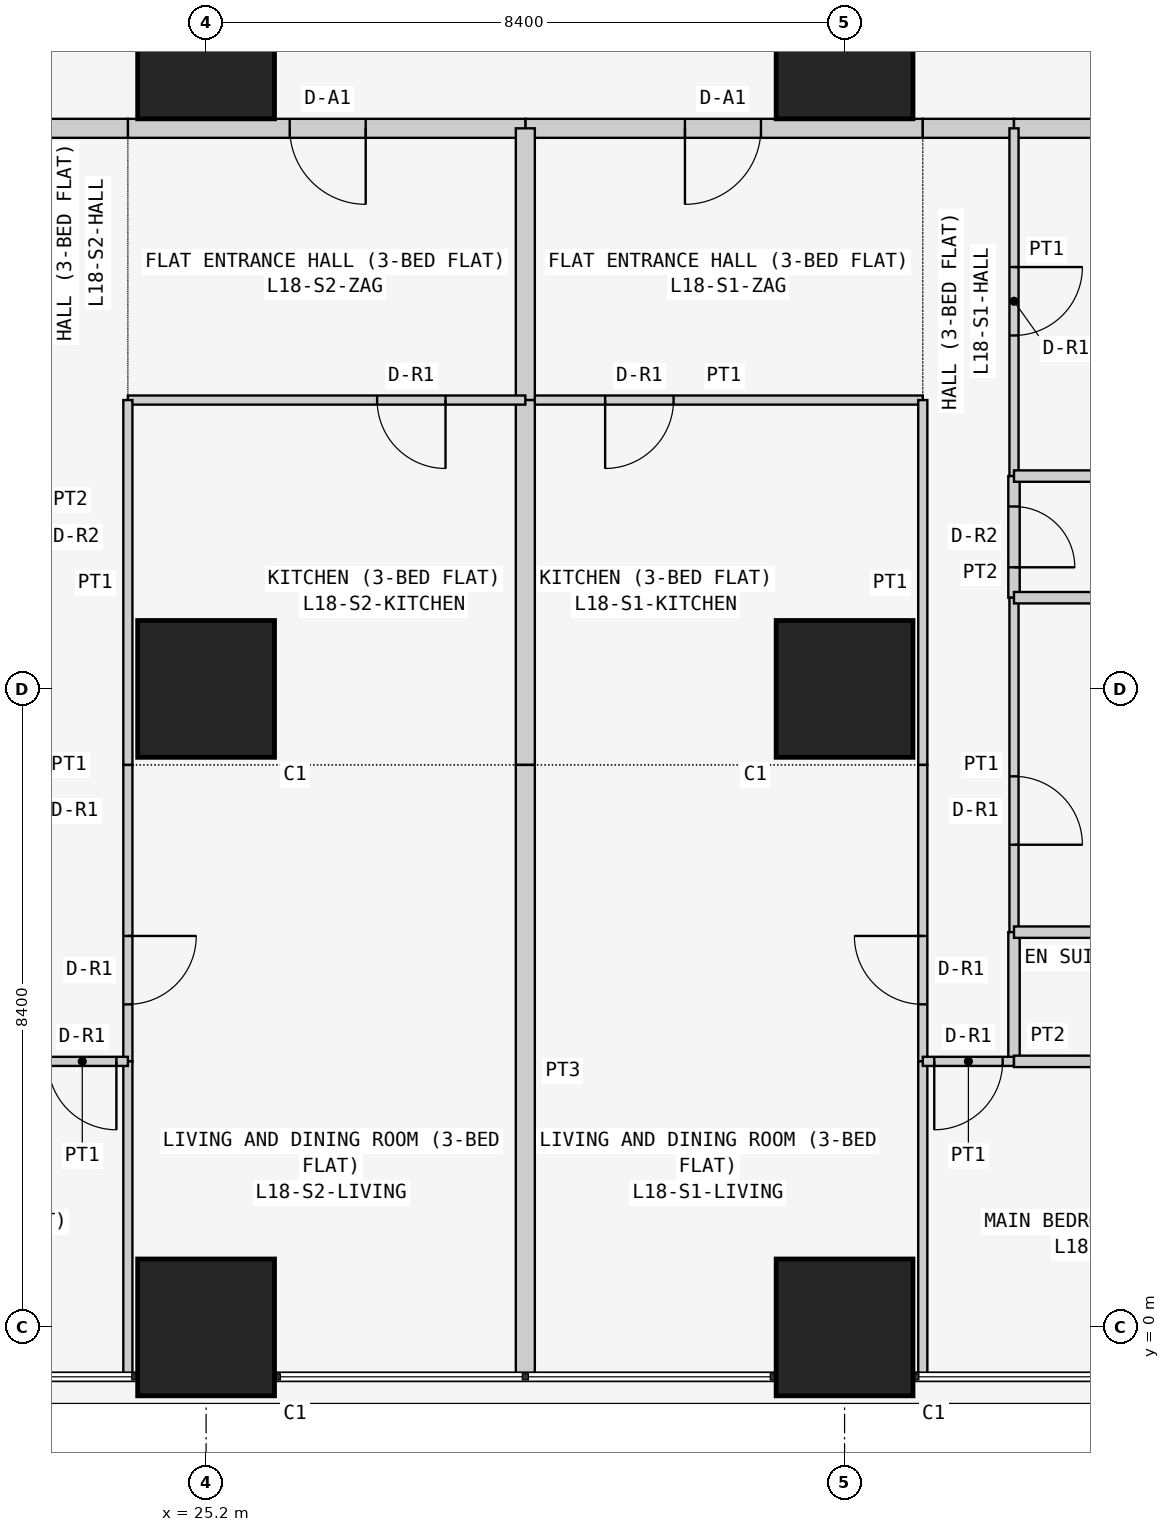
"""IFC4 building model, lengths in metres.
Left out: names, types, materials, properties, quantities, classifications, styles, units other than length and angle.
Written with IfcOpenShell. Run it as: python <this file> out.ifc"""

import sys

from ifc_helpers import new_model, si_unit, direction, frame, frame_2d, origin, origin_2d, place, context, subcontext, project, spatial, rectangle, extrude, element, fill, save


model = new_model("IFC4")
c1 = context("Model", 3, precision=1e-05, world=origin(), true_north=direction((0.0, 1.0)))
c2 = subcontext(c1, "Body", "Model", "MODEL_VIEW")
j1 = project(units=[si_unit("LENGTHUNIT", "METRE"), si_unit("PLANEANGLEUNIT", "RADIAN")], contexts=[c1])
p1 = place(None, origin())
s1 = spatial("IfcSite", under=j1, at=p1, CompositionType="ELEMENT")
p2 = place(p1, origin())
s2 = spatial("IfcBuilding", under=s1, at=p2, CompositionType="ELEMENT")
p3 = place(p2, frame((0.0, 0.0, 74.1)))
s3 = spatial("IfcBuildingStorey", under=s2, at=p3, CompositionType="ELEMENT", Elevation=74.1)
for number, where, z_axis, x_axis in (
    (1, (25.2, 0.0, 0.0), (0.0, 0.0, 1.0), (1.0, 0.0, 0.0)),
    (2, (25.2, 8.4, 0.0), (0.0, 0.0, 1.0), (1.0, 0.0, 0.0)),
    (3, (25.2, 16.8, 0.0), (0.0, 0.0, 1.0), (1.0, 0.0, 0.0)),
    (4, (33.6, 0.0, 0.0), (0.0, 0.0, 1.0), (1.0, 0.0, 0.0)),
    (5, (33.6, 8.4, 0.0), (0.0, 0.0, 1.0), (1.0, 0.0, 0.0)),
    (6, (33.6, 16.8, 0.0), (0.0, 0.0, 1.0), (1.0, 0.0, 0.0)),
):
    element("IfcColumn", number, at=place(p3, frame(where, z_axis=z_axis, x_axis=x_axis)), inside=s3, PredefinedType="COLUMN", context=c2, shape_type="SweptSolid", body=[
        extrude(rectangle(XDim=1.8, YDim=1.8, at=origin_2d()), origin(), (0.0, 0.0, 1.0), 3.6),
    ])
p4 = place(p3, frame((34.629, 15.775, 0.0), z_axis=(0.0, 0.0, 1.0), x_axis=(-1.0, 0.0, 0.0)))
e7 = element("IfcWall", 7, at=p4, inside=s3, PredefinedType="PARTITIONING", context=c2, shape_type="SweptSolid", body=[
    extrude(rectangle(XDim=5.229, YDim=0.25, at=frame_2d((2.615, 0.0))), origin(), (0.0, 0.0, 1.0), 3.45),
])
p5 = place(p4, frame((2.129, 0.0, 0.0)))
e8 = element("IfcOpeningElement", 8, at=p5, cuts=e7, PredefinedType="OPENING", context=c2, shape_type="SweptSolid", body=[
    extrude(rectangle(XDim=1.0, YDim=2.1, at=frame_2d((0.5, 1.05))), frame((0.0, 0.135, 0.0), z_axis=(0.0, -1.0, 0.0), x_axis=(1.0, 0.0, 0.0)), (0.0, 0.0, 1.0), 0.27),
])
p6 = place(p3, frame((35.829, 15.775, 0.0), z_axis=(0.0, 0.0, 1.0), x_axis=(-1.0, 0.0, 0.0)))
e9 = element("IfcWall", 9, at=p6, inside=s3, PredefinedType="PARTITIONING", context=c2, shape_type="SweptSolid", body=[
    extrude(rectangle(XDim=1.2, YDim=0.25, at=frame_2d((0.6, 0.0))), origin(), (0.0, 0.0, 1.0), 3.45),
])
p7 = place(p3, frame((42.7, 15.775, 0.0), z_axis=(0.0, 0.0, 1.0), x_axis=(-1.0, 0.0, 0.0)))
e10 = element("IfcWall", 10, at=p7, inside=s3, PredefinedType="PARTITIONING", context=c2, shape_type="SweptSolid", body=[
    extrude(rectangle(XDim=6.871, YDim=0.25, at=frame_2d((3.436, 0.0))), origin(), (0.0, 0.0, 1.0), 3.45),
])
p8 = place(p3, frame((29.4, 15.775, 0.0), z_axis=(0.0, 0.0, 1.0), x_axis=(-1.0, 0.0, 0.0)))
e11 = element("IfcWall", 11, at=p8, inside=s3, PredefinedType="PARTITIONING", context=c2, shape_type="SweptSolid", body=[
    extrude(rectangle(XDim=5.229, YDim=0.25, at=frame_2d((2.615, 0.0))), origin(), (0.0, 0.0, 1.0), 3.45),
])
p9 = place(p8, frame((2.1, 0.0, 0.0)))
e12 = element("IfcOpeningElement", 12, at=p9, cuts=e11, PredefinedType="OPENING", context=c2, shape_type="SweptSolid", body=[
    extrude(rectangle(XDim=1.0, YDim=2.1, at=frame_2d((0.5, 1.05))), frame((0.0, 0.135, 0.0), z_axis=(0.0, -1.0, 0.0), x_axis=(1.0, 0.0, 0.0)), (0.0, 0.0, 1.0), 0.27),
])
p10 = place(p3, frame((24.171, 15.775, 0.0), z_axis=(0.0, 0.0, 1.0), x_axis=(-1.0, 0.0, 0.0)))
e13 = element("IfcWall", 13, at=p10, inside=s3, PredefinedType="PARTITIONING", context=c2, shape_type="SweptSolid", body=[
    extrude(rectangle(XDim=1.2, YDim=0.25, at=frame_2d((0.6, 0.0))), origin(), (0.0, 0.0, 1.0), 3.45),
])
p11 = place(p3, frame((29.4, 12.2, 0.0), z_axis=(0.0, 0.0, 1.0), x_axis=(1.0, 0.0, 0.0)))
e14 = element("IfcWall", 14, at=p11, inside=s3, PredefinedType="PARTITIONING", context=c2, shape_type="SweptSolid", body=[
    extrude(rectangle(XDim=5.229, YDim=0.12, at=frame_2d((2.615, 0.0))), origin(), (0.0, 0.0, 1.0), 3.45),
])
p12 = place(p11, frame((1.05, 0.0, 0.0)))
e15 = element("IfcOpeningElement", 15, at=p12, cuts=e14, PredefinedType="OPENING", context=c2, shape_type="SweptSolid", body=[
    extrude(rectangle(XDim=0.9, YDim=2.1, at=frame_2d((0.45, 1.05))), frame((0.0, 0.07, 0.0), z_axis=(0.0, -1.0, 0.0), x_axis=(1.0, 0.0, 0.0)), (0.0, 0.0, 1.0), 0.14),
])
p13 = place(p3, frame((29.4, 15.775, 0.0), z_axis=(0.0, 0.0, 1.0), x_axis=(0.0, -1.0, 0.0)))
e16 = element("IfcWall", 16, at=p13, inside=s3, PredefinedType="PARTITIONING", context=c2, shape_type="SweptSolid", body=[
    extrude(rectangle(XDim=3.575, YDim=0.25, at=frame_2d((1.788, 0.0))), origin(), (0.0, 0.0, 1.0), 2.848),
])
p14 = place(p3, frame((34.629, 7.4, 0.0), z_axis=(0.0, 0.0, 1.0), x_axis=(0.0, 1.0, 0.0)))
e17 = element("IfcWall", 17, at=p14, inside=s3, PredefinedType="PARTITIONING", context=c2, shape_type="SweptSolid", body=[
    extrude(rectangle(XDim=4.8, YDim=0.12, at=frame_2d((2.4, 0.0))), origin(), (0.0, 0.0, 1.0), 3.45),
])
p15 = place(p3, frame((29.4, 12.2, 0.0), z_axis=(0.0, 0.0, 1.0), x_axis=(0.0, -1.0, 0.0)))
e18 = element("IfcWall", 18, at=p15, inside=s3, PredefinedType="PARTITIONING", context=c2, shape_type="SweptSolid", body=[
    extrude(rectangle(XDim=4.8, YDim=0.25, at=frame_2d((2.4, 0.0))), origin(), (0.0, 0.0, 1.0), 2.848),
])
p16 = place(p3, frame((34.629, 3.5, 0.0), z_axis=(0.0, 0.0, 1.0), x_axis=(0.0, 1.0, 0.0)))
e19 = element("IfcWall", 19, at=p16, inside=s3, PredefinedType="PARTITIONING", context=c2, shape_type="SweptSolid", body=[
    extrude(rectangle(XDim=3.9, YDim=0.12, at=frame_2d((1.95, 0.0))), origin(), (0.0, 0.0, 1.0), 3.45),
])
p17 = place(p16, frame((0.75, 0.0, 0.0)))
e20 = element("IfcOpeningElement", 20, at=p17, cuts=e19, PredefinedType="OPENING", context=c2, shape_type="SweptSolid", body=[
    extrude(rectangle(XDim=0.9, YDim=2.1, at=frame_2d((0.45, 1.05))), frame((0.0, 0.07, 0.0), z_axis=(0.0, -1.0, 0.0), x_axis=(1.0, 0.0, 0.0)), (0.0, 0.0, 1.0), 0.14),
])
p18 = place(p3, frame((34.629, -0.65, 0.0), z_axis=(0.0, 0.0, 1.0), x_axis=(0.0, 1.0, 0.0)))
e21 = element("IfcWall", 21, at=p18, inside=s3, PredefinedType="PARTITIONING", context=c2, shape_type="SweptSolid", body=[
    extrude(rectangle(XDim=4.15, YDim=0.12, at=frame_2d((2.075, 0.0))), origin(), (0.0, 0.0, 1.0), 3.45),
])
p19 = place(p3, frame((29.4, 7.4, 0.0), z_axis=(0.0, 0.0, 1.0), x_axis=(0.0, -1.0, 0.0)))
e22 = element("IfcWall", 22, at=p19, inside=s3, PredefinedType="PARTITIONING", context=c2, shape_type="SweptSolid", body=[
    extrude(rectangle(XDim=8.05, YDim=0.25, at=frame_2d((4.025, 0.0))), origin(), (0.0, 0.0, 1.0), 2.848),
])
p20 = place(p3, frame((35.829, 11.2, 0.0), z_axis=(0.0, 0.0, 1.0), x_axis=(0.0, 1.0, 0.0)))
e23 = element("IfcWall", 23, at=p20, inside=s3, PredefinedType="PARTITIONING", context=c2, shape_type="SweptSolid", body=[
    extrude(rectangle(XDim=4.575, YDim=0.12, at=frame_2d((2.288, 0.0))), origin(), (0.0, 0.0, 1.0), 3.45),
])
p21 = place(p20, frame((1.85, 0.0, 0.0)))
e24 = element("IfcOpeningElement", 24, at=p21, cuts=e23, PredefinedType="OPENING", context=c2, shape_type="SweptSolid", body=[
    extrude(rectangle(XDim=0.9, YDim=2.1, at=frame_2d((0.45, 1.05))), frame((0.0, 0.07, 0.0), z_axis=(0.0, -1.0, 0.0), x_axis=(1.0, 0.0, 0.0)), (0.0, 0.0, 1.0), 0.14),
])
p22 = place(p3, frame((35.829, 9.6, 0.0), z_axis=(0.0, 0.0, 1.0), x_axis=(0.0, 1.0, 0.0)))
e25 = element("IfcWall", 25, at=p22, inside=s3, PredefinedType="PARTITIONING", context=c2, shape_type="SweptSolid", body=[
    extrude(rectangle(XDim=1.6, YDim=0.15, at=frame_2d((0.8, 0.0))), origin(), (0.0, 0.0, 1.0), 3.45),
])
p23 = place(p22, frame((0.4, 0.0, 0.0)))
e26 = element("IfcOpeningElement", 26, at=p23, cuts=e25, PredefinedType="OPENING", context=c2, shape_type="SweptSolid", body=[
    extrude(rectangle(XDim=0.8, YDim=2.1, at=frame_2d((0.4, 1.05))), frame((0.0, 0.085, 0.0), z_axis=(0.0, -1.0, 0.0), x_axis=(1.0, 0.0, 0.0)), (0.0, 0.0, 1.0), 0.17),
])
p24 = place(p3, frame((35.829, 5.2, 0.0), z_axis=(0.0, 0.0, 1.0), x_axis=(0.0, 1.0, 0.0)))
e27 = element("IfcWall", 27, at=p24, inside=s3, PredefinedType="PARTITIONING", context=c2, shape_type="SweptSolid", body=[
    extrude(rectangle(XDim=4.4, YDim=0.12, at=frame_2d((2.2, 0.0))), origin(), (0.0, 0.0, 1.0), 3.45),
])
p25 = place(p24, frame((1.15, 0.0, 0.0)))
e28 = element("IfcOpeningElement", 28, at=p25, cuts=e27, PredefinedType="OPENING", context=c2, shape_type="SweptSolid", body=[
    extrude(rectangle(XDim=0.9, YDim=2.1, at=frame_2d((0.45, 1.05))), frame((0.0, 0.07, 0.0), z_axis=(0.0, -1.0, 0.0), x_axis=(1.0, 0.0, 0.0)), (0.0, 0.0, 1.0), 0.14),
])
p26 = place(p3, frame((35.829, 3.5, 0.0), z_axis=(0.0, 0.0, 1.0), x_axis=(0.0, 1.0, 0.0)))
e29 = element("IfcWall", 29, at=p26, inside=s3, PredefinedType="PARTITIONING", context=c2, shape_type="SweptSolid", body=[
    extrude(rectangle(XDim=1.7, YDim=0.15, at=frame_2d((0.85, 0.0))), origin(), (0.0, 0.0, 1.0), 3.45),
])
p27 = place(p3, frame((34.629, 3.5, 0.0), z_axis=(0.0, 0.0, 1.0), x_axis=(1.0, 0.0, 0.0)))
e30 = element("IfcWall", 30, at=p27, inside=s3, PredefinedType="PARTITIONING", context=c2, shape_type="SweptSolid", body=[
    extrude(rectangle(XDim=1.2, YDim=0.12, at=frame_2d((0.6, 0.0))), origin(), (0.0, 0.0, 1.0), 3.45),
])
p28 = place(p27, frame((0.151, 0.0, 0.0)))
e31 = element("IfcOpeningElement", 31, at=p28, cuts=e30, PredefinedType="OPENING", context=c2, shape_type="SweptSolid", body=[
    extrude(rectangle(XDim=0.9, YDim=2.1, at=frame_2d((0.45, 1.05))), frame((0.0, 0.07, 0.0), z_axis=(0.0, -1.0, 0.0), x_axis=(1.0, 0.0, 0.0)), (0.0, 0.0, 1.0), 0.14),
])
for number, where, z_axis, x_axis in (
    (32, (35.829, 11.2, 0.0), (0.0, 0.0, 1.0), (1.0, 0.0, 0.0)),
    (33, (35.829, 9.6, 0.0), (0.0, 0.0, 1.0), (1.0, 0.0, 0.0)),
    (34, (35.829, 5.2, 0.0), (0.0, 0.0, 1.0), (1.0, 0.0, 0.0)),
):
    element("IfcWall", number, at=place(p3, frame(where, z_axis=z_axis, x_axis=x_axis)), inside=s3, PredefinedType="PARTITIONING", context=c2, shape_type="SweptSolid", body=[
        extrude(rectangle(XDim=6.871, YDim=0.15, at=frame_2d((3.436, 0.0))), origin(), (0.0, 0.0, 1.0), 3.45),
    ])
p29 = place(p3, frame((35.829, 3.5, 0.0), z_axis=(0.0, 0.0, 1.0), x_axis=(1.0, 0.0, 0.0)))
e35 = element("IfcWall", 35, at=p29, inside=s3, PredefinedType="PARTITIONING", context=c2, shape_type="SweptSolid", body=[
    extrude(rectangle(XDim=6.871, YDim=0.15, at=frame_2d((3.436, 0.0))), origin(), (0.0, 0.0, 1.0), 3.45),
])
p30 = place(p29, frame((3.171, 0.0, 0.0)))
e36 = element("IfcOpeningElement", 36, at=p30, cuts=e35, PredefinedType="OPENING", context=c2, shape_type="SweptSolid", body=[
    extrude(rectangle(XDim=0.8, YDim=2.1, at=frame_2d((0.4, 1.05))), frame((0.0, 0.085, 0.0), z_axis=(0.0, -1.0, 0.0), x_axis=(1.0, 0.0, 0.0)), (0.0, 0.0, 1.0), 0.17),
])
p31 = place(p3, frame((29.4, 12.2, 0.0), z_axis=(0.0, 0.0, 1.0), x_axis=(-1.0, 0.0, 0.0)))
e37 = element("IfcWall", 37, at=p31, inside=s3, PredefinedType="PARTITIONING", context=c2, shape_type="SweptSolid", body=[
    extrude(rectangle(XDim=5.229, YDim=0.12, at=frame_2d((2.615, 0.0))), origin(), (0.0, 0.0, 1.0), 3.45),
])
p32 = place(p31, frame((1.05, 0.0, 0.0)))
e38 = element("IfcOpeningElement", 38, at=p32, cuts=e37, PredefinedType="OPENING", context=c2, shape_type="SweptSolid", body=[
    extrude(rectangle(XDim=0.9, YDim=2.1, at=frame_2d((0.45, 1.05))), frame((0.0, 0.07, 0.0), z_axis=(0.0, -1.0, 0.0), x_axis=(1.0, 0.0, 0.0)), (0.0, 0.0, 1.0), 0.14),
])
p33 = place(p3, frame((24.171, 7.4, 0.0), z_axis=(0.0, 0.0, 1.0), x_axis=(0.0, 1.0, 0.0)))
e39 = element("IfcWall", 39, at=p33, inside=s3, PredefinedType="PARTITIONING", context=c2, shape_type="SweptSolid", body=[
    extrude(rectangle(XDim=4.8, YDim=0.12, at=frame_2d((2.4, 0.0))), origin(), (0.0, 0.0, 1.0), 3.45),
])
p34 = place(p3, frame((24.171, 3.5, 0.0), z_axis=(0.0, 0.0, 1.0), x_axis=(0.0, 1.0, 0.0)))
e40 = element("IfcWall", 40, at=p34, inside=s3, PredefinedType="PARTITIONING", context=c2, shape_type="SweptSolid", body=[
    extrude(rectangle(XDim=3.9, YDim=0.12, at=frame_2d((1.95, 0.0))), origin(), (0.0, 0.0, 1.0), 3.45),
])
p35 = place(p34, frame((0.75, 0.0, 0.0)))
e41 = element("IfcOpeningElement", 41, at=p35, cuts=e40, PredefinedType="OPENING", context=c2, shape_type="SweptSolid", body=[
    extrude(rectangle(XDim=0.9, YDim=2.1, at=frame_2d((0.45, 1.05))), frame((0.0, 0.07, 0.0), z_axis=(0.0, -1.0, 0.0), x_axis=(1.0, 0.0, 0.0)), (0.0, 0.0, 1.0), 0.14),
])
p36 = place(p3, frame((24.171, -0.65, 0.0), z_axis=(0.0, 0.0, 1.0), x_axis=(0.0, 1.0, 0.0)))
e42 = element("IfcWall", 42, at=p36, inside=s3, PredefinedType="PARTITIONING", context=c2, shape_type="SweptSolid", body=[
    extrude(rectangle(XDim=4.15, YDim=0.12, at=frame_2d((2.075, 0.0))), origin(), (0.0, 0.0, 1.0), 3.45),
])
p37 = place(p3, frame((24.171, 3.5, 0.0), z_axis=(0.0, 0.0, 1.0), x_axis=(-1.0, 0.0, 0.0)))
e43 = element("IfcWall", 43, at=p37, inside=s3, PredefinedType="PARTITIONING", context=c2, shape_type="SweptSolid", body=[
    extrude(rectangle(XDim=1.2, YDim=0.12, at=frame_2d((0.6, 0.0))), origin(), (0.0, 0.0, 1.0), 3.45),
])
p38 = place(p37, frame((0.151, 0.0, 0.0)))
e44 = element("IfcOpeningElement", 44, at=p38, cuts=e43, PredefinedType="OPENING", context=c2, shape_type="SweptSolid", body=[
    extrude(rectangle(XDim=0.9, YDim=2.1, at=frame_2d((0.45, 1.05))), frame((0.0, 0.07, 0.0), z_axis=(0.0, -1.0, 0.0), x_axis=(1.0, 0.0, 0.0)), (0.0, 0.0, 1.0), 0.14),
])
p39 = place(p5, origin())
e45 = element("IfcDoor", 45, at=p39, inside=s3, OperationType="SINGLE_SWING_RIGHT", PredefinedType="DOOR", context=c2, shape_type="SweptSolid", body=[
    extrude(rectangle(XDim=1.0, YDim=2.1, at=frame_2d((0.5, 1.05))), frame((0.0, 0.025, 0.0), z_axis=(0.0, -1.0, 0.0), x_axis=(1.0, 0.0, 0.0)), (0.0, 0.0, 1.0), 0.05),
])
fill(e8, e45)
p40 = place(p12, frame((0.9, 0.0, 0.0), z_axis=(0.0, 0.0, 1.0), x_axis=(-1.0, 0.0, 0.0)))
e46 = element("IfcDoor", 46, at=p40, inside=s3, OperationType="SINGLE_SWING_RIGHT", PredefinedType="DOOR", context=c2, shape_type="SweptSolid", body=[
    extrude(rectangle(XDim=0.9, YDim=2.1, at=frame_2d((0.45, 1.05))), frame((0.0, 0.025, 0.0), z_axis=(0.0, -1.0, 0.0), x_axis=(1.0, 0.0, 0.0)), (0.0, 0.0, 1.0), 0.05),
])
fill(e15, e46)
p41 = place(p17, origin())
e47 = element("IfcDoor", 47, at=p41, inside=s3, OperationType="SINGLE_SWING_RIGHT", PredefinedType="DOOR", context=c2, shape_type="SweptSolid", body=[
    extrude(rectangle(XDim=0.9, YDim=2.1, at=frame_2d((0.45, 1.05))), frame((0.0, 0.025, 0.0), z_axis=(0.0, -1.0, 0.0), x_axis=(1.0, 0.0, 0.0)), (0.0, 0.0, 1.0), 0.05),
])
fill(e20, e47)
p42 = place(p21, frame((0.9, 0.0, 0.0), z_axis=(0.0, 0.0, 1.0), x_axis=(-1.0, 0.0, 0.0)))
e48 = element("IfcDoor", 48, at=p42, inside=s3, OperationType="SINGLE_SWING_LEFT", PredefinedType="DOOR", context=c2, shape_type="SweptSolid", body=[
    extrude(rectangle(XDim=0.9, YDim=2.1, at=frame_2d((0.45, 1.05))), frame((0.0, 0.025, 0.0), z_axis=(0.0, -1.0, 0.0), x_axis=(1.0, 0.0, 0.0)), (0.0, 0.0, 1.0), 0.05),
])
fill(e24, e48)
p43 = place(p23, frame((0.8, 0.0, 0.0), z_axis=(0.0, 0.0, 1.0), x_axis=(-1.0, 0.0, 0.0)))
e49 = element("IfcDoor", 49, at=p43, inside=s3, OperationType="SINGLE_SWING_RIGHT", PredefinedType="DOOR", context=c2, shape_type="SweptSolid", body=[
    extrude(rectangle(XDim=0.8, YDim=2.1, at=frame_2d((0.4, 1.05))), frame((0.0, 0.025, 0.0), z_axis=(0.0, -1.0, 0.0), x_axis=(1.0, 0.0, 0.0)), (0.0, 0.0, 1.0), 0.05),
])
fill(e26, e49)
p44 = place(p25, frame((0.9, 0.0, 0.0), z_axis=(0.0, 0.0, 1.0), x_axis=(-1.0, 0.0, 0.0)))
e50 = element("IfcDoor", 50, at=p44, inside=s3, OperationType="SINGLE_SWING_RIGHT", PredefinedType="DOOR", context=c2, shape_type="SweptSolid", body=[
    extrude(rectangle(XDim=0.9, YDim=2.1, at=frame_2d((0.45, 1.05))), frame((0.0, 0.025, 0.0), z_axis=(0.0, -1.0, 0.0), x_axis=(1.0, 0.0, 0.0)), (0.0, 0.0, 1.0), 0.05),
])
fill(e28, e50)
p45 = place(p28, frame((0.9, 0.0, 0.0), z_axis=(0.0, 0.0, 1.0), x_axis=(-1.0, 0.0, 0.0)))
e51 = element("IfcDoor", 51, at=p45, inside=s3, OperationType="SINGLE_SWING_RIGHT", PredefinedType="DOOR", context=c2, shape_type="SweptSolid", body=[
    extrude(rectangle(XDim=0.9, YDim=2.1, at=frame_2d((0.45, 1.05))), frame((0.0, 0.025, 0.0), z_axis=(0.0, -1.0, 0.0), x_axis=(1.0, 0.0, 0.0)), (0.0, 0.0, 1.0), 0.05),
])
fill(e31, e51)
p46 = place(p9, origin())
e52 = element("IfcDoor", 52, at=p46, inside=s3, OperationType="SINGLE_SWING_LEFT", PredefinedType="DOOR", context=c2, shape_type="SweptSolid", body=[
    extrude(rectangle(XDim=1.0, YDim=2.1, at=frame_2d((0.5, 1.05))), frame((0.0, 0.025, 0.0), z_axis=(0.0, -1.0, 0.0), x_axis=(1.0, 0.0, 0.0)), (0.0, 0.0, 1.0), 0.05),
])
fill(e12, e52)
p47 = place(p32, origin())
e53 = element("IfcDoor", 53, at=p47, inside=s3, OperationType="SINGLE_SWING_LEFT", PredefinedType="DOOR", context=c2, shape_type="SweptSolid", body=[
    extrude(rectangle(XDim=0.9, YDim=2.1, at=frame_2d((0.45, 1.05))), frame((0.0, 0.025, 0.0), z_axis=(0.0, -1.0, 0.0), x_axis=(1.0, 0.0, 0.0)), (0.0, 0.0, 1.0), 0.05),
])
fill(e38, e53)
p48 = place(p35, frame((0.9, 0.0, 0.0), z_axis=(0.0, 0.0, 1.0), x_axis=(-1.0, 0.0, 0.0)))
e54 = element("IfcDoor", 54, at=p48, inside=s3, OperationType="SINGLE_SWING_LEFT", PredefinedType="DOOR", context=c2, shape_type="SweptSolid", body=[
    extrude(rectangle(XDim=0.9, YDim=2.1, at=frame_2d((0.45, 1.05))), frame((0.0, 0.025, 0.0), z_axis=(0.0, -1.0, 0.0), x_axis=(1.0, 0.0, 0.0)), (0.0, 0.0, 1.0), 0.05),
])
fill(e41, e54)
p49 = place(p38, origin())
e55 = element("IfcDoor", 55, at=p49, inside=s3, OperationType="SINGLE_SWING_LEFT", PredefinedType="DOOR", context=c2, shape_type="SweptSolid", body=[
    extrude(rectangle(XDim=0.9, YDim=2.1, at=frame_2d((0.45, 1.05))), frame((0.0, 0.025, 0.0), z_axis=(0.0, -1.0, 0.0), x_axis=(1.0, 0.0, 0.0)), (0.0, 0.0, 1.0), 0.05),
])
fill(e44, e55)
save(model, sys.argv[1])
